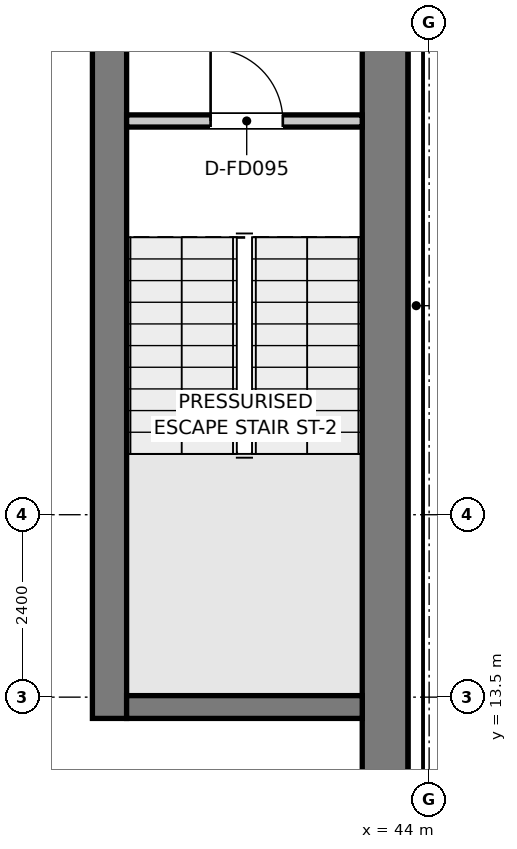
"""IFC4 building model, lengths in metres.
Left out: names, types, materials, properties, quantities, classifications, styles, units other than length and angle.
Written with IfcOpenShell. Run it as: python <this file> out.ifc"""

import sys

from ifc_helpers import new_model, si_unit, direction, frame, frame_2d, origin, place, context, subcontext, project, spatial, rectangle, extrude, element, fill, save


model = new_model("IFC4")
c1 = context("Model", 3, precision=1e-05, world=origin(), true_north=direction((0.0, 1.0)))
c2 = subcontext(c1, "Body", "Model", "MODEL_VIEW")
j1 = project(units=[si_unit("LENGTHUNIT", "METRE"), si_unit("PLANEANGLEUNIT", "RADIAN")], contexts=[c1])
p1 = place(None, origin())
s1 = spatial("IfcSite", under=j1, at=p1, CompositionType="ELEMENT")
p2 = place(p1, origin())
s2 = spatial("IfcBuilding", under=s1, at=p2, CompositionType="ELEMENT")
p3 = place(p2, frame((0.0, 0.0, 381.85)))
s3 = spatial("IfcBuildingStorey", under=s2, at=p3, CompositionType="ELEMENT", Elevation=381.85)
p4 = place(p3, frame((39.795, 13.22, 0.0), z_axis=(0.0, 0.0, 1.0), x_axis=(0.0, 1.0, 0.0)))
e1 = element("IfcWall", 1, at=p4, inside=s3, PredefinedType="SHEAR", context=c2, shape_type="SweptSolid", body=[
    extrude(rectangle(XDim=12.98, YDim=0.45, at=frame_2d((6.49, 0.0))), origin(), (0.0, 0.0, 1.0), 3.6),
])
p5 = place(p4, frame((10.58, 0.0, 0.0)))
e2 = element("IfcOpeningElement", 2, at=p5, cuts=e1, PredefinedType="OPENING", context=c2, shape_type="SweptSolid", body=[
    extrude(rectangle(XDim=1.1, YDim=2.15, at=frame_2d((0.55, 1.075))), frame((0.0, 0.235, 0.0), z_axis=(0.0, -1.0, 0.0), x_axis=(1.0, 0.0, 0.0)), (0.0, 0.0, 1.0), 0.47),
])
p6 = place(p3, frame((43.42, 11.1, 0.0), z_axis=(0.0, 0.0, 1.0), x_axis=(0.0, 1.0, 0.0)))
e3 = element("IfcWall", 3, at=p6, inside=s3, PredefinedType="SHEAR", context=c2, shape_type="SweptSolid", body=[
    extrude(rectangle(XDim=15.1, YDim=0.6, at=frame_2d((7.55, 0.0))), origin(), (0.0, 0.0, 1.0), 3.6),
])
p7 = place(p3, frame((40.02, 13.37, 0.0), z_axis=(0.0, 0.0, 1.0), x_axis=(1.0, 0.0, 0.0)))
e4 = element("IfcWall", 4, at=p7, inside=s3, PredefinedType="SHEAR", context=c2, shape_type="SweptSolid", body=[
    extrude(rectangle(XDim=3.1, YDim=0.3, at=frame_2d((1.55, 0.0))), origin(), (0.0, 0.0, 1.0), 3.6),
])
p8 = place(p3, frame((40.02, 21.08, 0.0), z_axis=(0.0, 0.0, 1.0), x_axis=(1.0, 0.0, 0.0)))
e5 = element("IfcWall", 5, at=p8, inside=s3, PredefinedType="PARTITIONING", context=c2, shape_type="SweptSolid", body=[
    extrude(rectangle(XDim=3.1, YDim=0.16, at=frame_2d((1.55, 0.0))), origin(), (0.0, 0.0, 1.0), 3.3),
])
p9 = place(p8, frame((1.105, 0.0, 0.0)))
e6 = element("IfcOpeningElement", 6, at=p9, cuts=e5, PredefinedType="OPENING", context=c2, shape_type="SweptSolid", body=[
    extrude(rectangle(XDim=0.95, YDim=2.1, at=frame_2d((0.475, 1.05))), frame((0.0, 0.09, 0.0), z_axis=(0.0, -1.0, 0.0), x_axis=(1.0, 0.0, 0.0)), (0.0, 0.0, 1.0), 0.18),
])
p10 = place(p9, origin())
e7 = element("IfcDoor", 7, at=p10, inside=s3, OperationType="SINGLE_SWING_LEFT", PredefinedType="DOOR", context=c2, shape_type="SweptSolid", body=[
    extrude(rectangle(XDim=0.95, YDim=2.1, at=frame_2d((0.475, 1.05))), frame((0.0, 0.025, 0.0), z_axis=(0.0, -1.0, 0.0), x_axis=(1.0, 0.0, 0.0)), (0.0, 0.0, 1.0), 0.05),
])
fill(e6, e7)
save(model, sys.argv[1])
